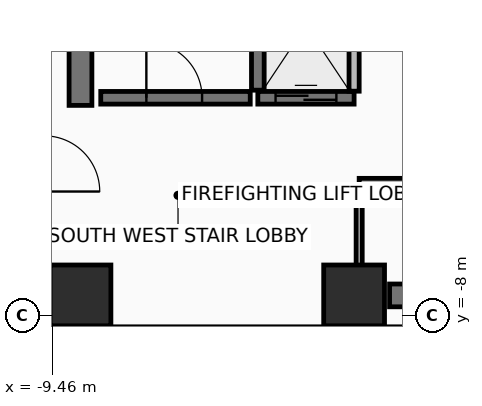
"""IFC4 building model, lengths in metres.
Left out: names, types, materials, properties, quantities, classifications, styles, units other than length and angle.
Written with IfcOpenShell. Run it as: python <this file> out.ifc"""

import sys

from ifc_helpers import new_model, si_unit, direction, frame, frame_2d, origin, origin_2d, place, context, subcontext, project, spatial, rectangle, extrude, element, fill, save


model = new_model("IFC4")
c1 = context("Model", 3, precision=1e-05, world=origin(), true_north=direction((0.0, 1.0)))
c2 = subcontext(c1, "Body", "Model", "MODEL_VIEW")
j1 = project(units=[si_unit("LENGTHUNIT", "METRE"), si_unit("PLANEANGLEUNIT", "RADIAN")], contexts=[c1])
p1 = place(None, origin())
s1 = spatial("IfcSite", under=j1, at=p1, CompositionType="ELEMENT")
p2 = place(p1, origin())
s2 = spatial("IfcBuilding", under=s1, at=p2, CompositionType="ELEMENT")
p3 = place(p2, frame((0.0, 0.0, 142.4)))
s3 = spatial("IfcBuildingStorey", under=s2, at=p3, CompositionType="ELEMENT", Elevation=142.4)
for number, where, z_axis, x_axis in (
    (1, (-8.9, -7.6, 0.0), (0.0, 0.0, 1.0), (1.0, 0.0, 0.0)),
    (2, (-3.5, -7.6, 0.0), (0.0, 0.0, 1.0), (1.0, 0.0, 0.0)),
):
    element("IfcColumn", number, at=place(p3, frame(where, z_axis=z_axis, x_axis=x_axis)), inside=s3, PredefinedType="COLUMN", context=c2, shape_type="SweptSolid", body=[
        extrude(rectangle(XDim=1.2, YDim=1.2, at=origin_2d()), origin(), (0.0, 0.0, 1.0), 3.6),
    ])
p4 = place(p3, frame((-2.8, -7.6, 0.0), z_axis=(0.0, 0.0, 1.0), x_axis=(1.0, 0.0, 0.0)))
e3 = element("IfcWall", 3, at=p4, inside=s3, PredefinedType="SHEAR", context=c2, shape_type="SweptSolid", body=[
    extrude(rectangle(XDim=5.38, YDim=0.45, at=frame_2d((2.69, 0.0))), origin(), (0.0, 0.0, 1.0), 3.41),
])
p5 = place(p3, frame((-8.9, -3.85, 0.0), z_axis=(0.0, 0.0, 1.0), x_axis=(0.0, 1.0, 0.0)))
e4 = element("IfcWall", 4, at=p5, inside=s3, PredefinedType="SHEAR", context=c2, shape_type="SweptSolid", body=[
    extrude(rectangle(XDim=10.7, YDim=0.45, at=frame_2d((5.35, 0.0))), origin(), (0.0, 0.0, 1.0), 3.41),
])
p6 = place(p3, frame((-5.4, -3.55, 0.0), z_axis=(0.0, 0.0, 1.0), x_axis=(0.0, 1.0, 0.0)))
e5 = element("IfcWall", 5, at=p6, inside=s3, PredefinedType="SHEAR", context=c2, shape_type="SweptSolid", body=[
    extrude(rectangle(XDim=7.3, YDim=0.25, at=frame_2d((3.65, 0.0))), origin(), (0.0, 0.0, 1.0), 3.41),
])
p7 = place(p3, frame((-8.5, -3.7, 0.0), z_axis=(0.0, 0.0, 1.0), x_axis=(1.0, 0.0, 0.0)))
e6 = element("IfcWall", 6, at=p7, inside=s3, PredefinedType="SHEAR", context=c2, shape_type="SweptSolid", body=[
    extrude(rectangle(XDim=2.95, YDim=0.25, at=frame_2d((1.475, 0.0))), origin(), (0.0, 0.0, 1.0), 3.41),
])
p8 = place(p7, frame((0.9, 0.0, 0.0)))
e7 = element("IfcOpeningElement", 7, at=p8, cuts=e6, PredefinedType="OPENING", context=c2, shape_type="SweptSolid", body=[
    extrude(rectangle(XDim=1.1, YDim=2.15, at=frame_2d((0.55, 1.075))), frame((0.0, 0.135, 0.0), z_axis=(0.0, -1.0, 0.0), x_axis=(1.0, 0.0, 0.0)), (0.0, 0.0, 1.0), 0.27),
])
p9 = place(p3, frame((-5.4, -3.7, 0.0), z_axis=(0.0, 0.0, 1.0), x_axis=(1.0, 0.0, 0.0)))
e8 = element("IfcWall", 8, at=p9, inside=s3, PredefinedType="SHEAR", context=c2, shape_type="SweptSolid", body=[
    extrude(rectangle(XDim=1.9, YDim=0.25, at=frame_2d((0.95, 0.0))), origin(), (0.0, 0.0, 1.0), 3.41),
])
p10 = place(p9, frame((0.35, 0.0, 0.0)))
e9 = element("IfcOpeningElement", 9, at=p10, cuts=e8, PredefinedType="OPENING", context=c2, shape_type="SweptSolid", body=[
    extrude(rectangle(XDim=1.2, YDim=2.2, at=frame_2d((0.6, 1.1))), frame((0.0, 0.135, 0.0), z_axis=(0.0, -1.0, 0.0), x_axis=(1.0, 0.0, 0.0)), (0.0, 0.0, 1.0), 0.27),
])
p11 = place(p3, frame((-3.5, -3.57, 0.0), z_axis=(0.0, 0.0, 1.0), x_axis=(0.0, 1.0, 0.0)))
e10 = element("IfcWall", 10, at=p11, inside=s3, PredefinedType="PARTITIONING", context=c2, shape_type="SweptSolid", body=[
    extrude(rectangle(XDim=2.615, YDim=0.2, at=frame_2d((1.308, 0.0))), origin(), (0.0, 0.0, 1.0), 3.41),
])
p12 = place(p3, frame((-0.265, -5.35, 0.0), z_axis=(0.0, 0.0, 1.0), x_axis=(-1.0, 0.0, 0.0)))
e11 = element("IfcWall", 11, at=p12, inside=s3, PredefinedType="PARTITIONING", context=c2, shape_type="SweptSolid", body=[
    extrude(rectangle(XDim=3.135, YDim=0.12, at=frame_2d((1.567, 0.0))), origin(), (0.0, 0.0, 1.0), 2.605),
])
p13 = place(p3, frame((-3.4, -5.415, 0.0), z_axis=(0.0, 0.0, 1.0), x_axis=(0.0, -1.0, 0.0)))
e12 = element("IfcWall", 12, at=p13, inside=s3, PredefinedType="PARTITIONING", context=c2, shape_type="SweptSolid", body=[
    extrude(rectangle(XDim=2.8, YDim=0.12, at=frame_2d((1.4, 0.0))), origin(), (0.0, 0.0, 1.0), 2.605),
])
p14 = place(p8, origin())
e13 = element("IfcDoor", 13, at=p14, inside=s3, OperationType="SINGLE_SWING_LEFT", PredefinedType="DOOR", context=c2, shape_type="SweptSolid", body=[
    extrude(rectangle(XDim=1.1, YDim=2.15, at=frame_2d((0.55, 1.075))), frame((0.0, 0.025, 0.0), z_axis=(0.0, -1.0, 0.0), x_axis=(1.0, 0.0, 0.0)), (0.0, 0.0, 1.0), 0.05),
])
fill(e7, e13)
p15 = place(p10, origin())
e14 = element("IfcDoor", 14, at=p15, inside=s3, OperationType="SLIDING_TO_RIGHT", PredefinedType="DOOR", context=c2, shape_type="SweptSolid", body=[
    extrude(rectangle(XDim=1.2, YDim=2.2, at=frame_2d((0.6, 1.1))), frame((0.0, 0.025, 0.0), z_axis=(0.0, -1.0, 0.0), x_axis=(1.0, 0.0, 0.0)), (0.0, 0.0, 1.0), 0.05),
])
fill(e9, e14)
save(model, sys.argv[1])
